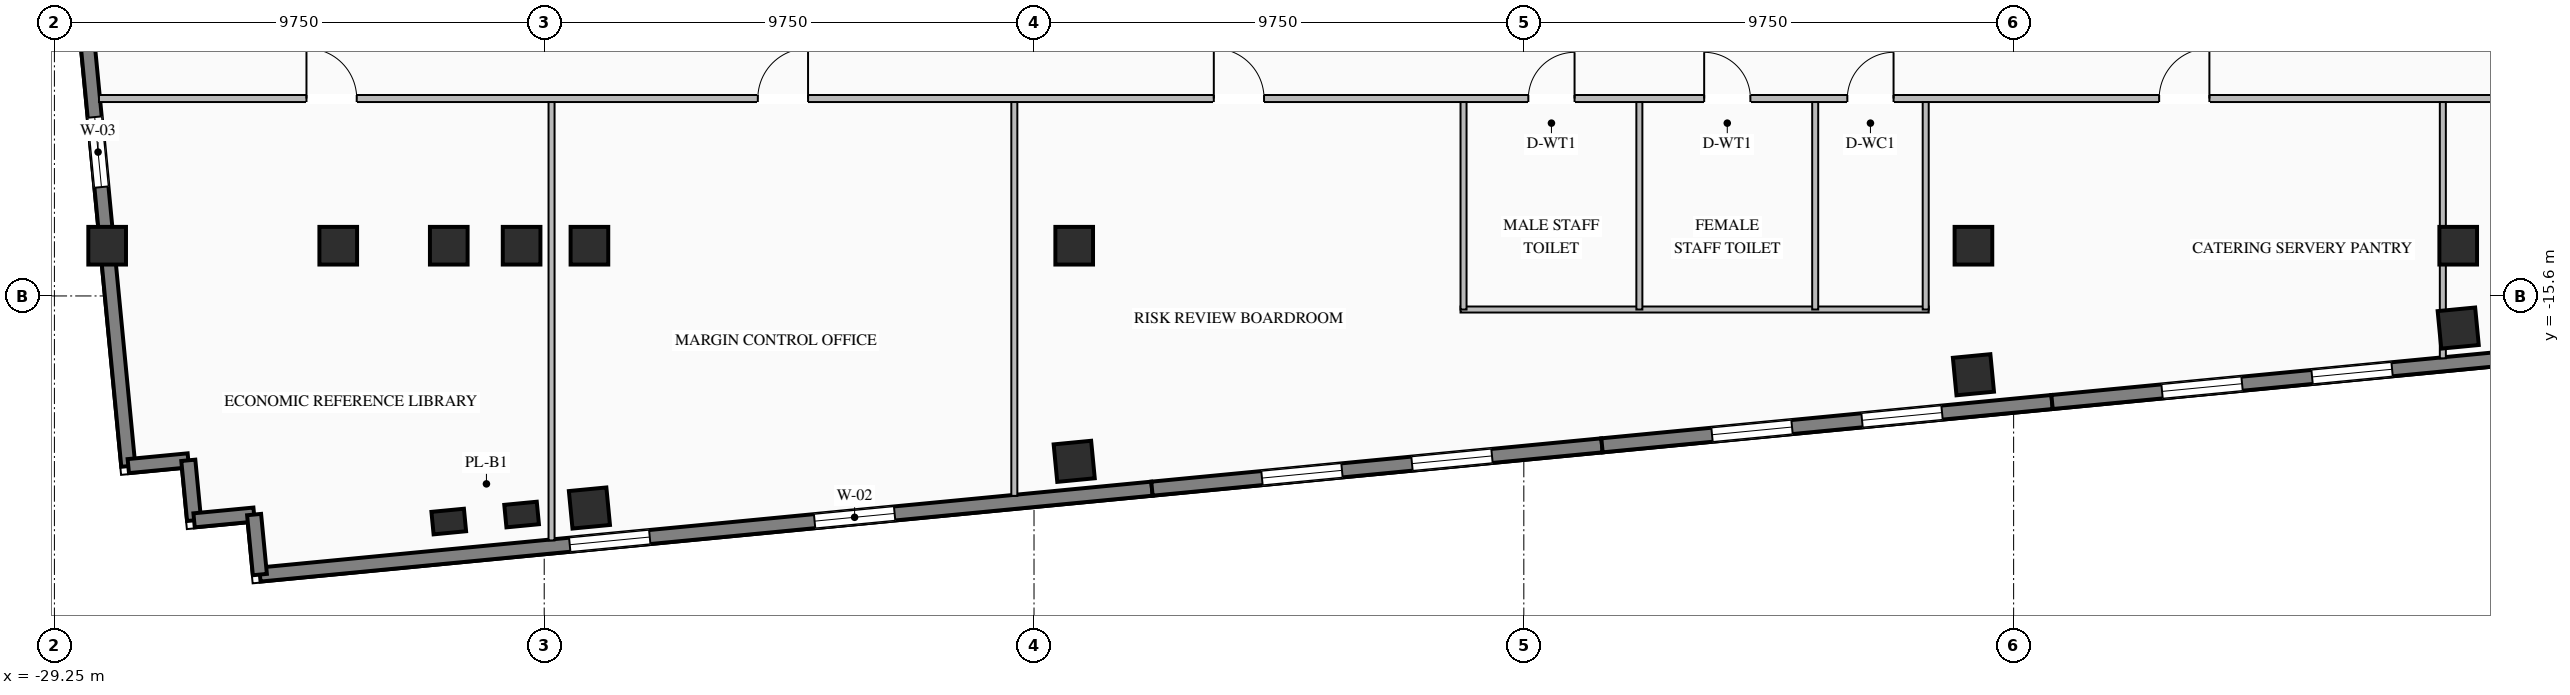
"""IFC4 building model, lengths in metres.
Left out: names, types, materials, properties, quantities, classifications, styles, units other than length and angle.
Written with IfcOpenShell. Run it as: python <this file> out.ifc"""

import sys

from ifc_helpers import new_model, si_unit, direction, frame, frame_2d, origin, origin_2d, place, context, subcontext, project, spatial, rectangle, i_section, extrude, element, fill, save


model = new_model("IFC4")
c1 = context("Model", 3, precision=1e-05, world=origin(), true_north=direction((0.0, 1.0)))
c2 = subcontext(c1, "Body", "Model", "MODEL_VIEW")
j1 = project(units=[si_unit("LENGTHUNIT", "METRE"), si_unit("PLANEANGLEUNIT", "RADIAN")], contexts=[c1])
p1 = place(None, origin())
s1 = spatial("IfcSite", under=j1, at=p1, CompositionType="ELEMENT")
p2 = place(p1, origin())
s2 = spatial("IfcBuilding", under=s1, at=p2, CompositionType="ELEMENT")
p3 = place(p2, frame((0.0, 0.0, 101.8)))
s3 = spatial("IfcBuildingStorey", under=s2, at=p3, CompositionType="ELEMENT", Elevation=101.8)
for number, where, z_axis, x_axis in (
    (1, (-21.4, -14.6, 0.0), (0.0, 0.0, 1.0), (1.0, 0.0, 0.0)),
    (2, (-19.95, -14.6, 0.0), (0.0, 0.0, 1.0), (1.0, 0.0, 0.0)),
    (3, (-18.6, -14.6, 0.0), (0.0, 0.0, 1.0), (1.0, 0.0, 0.0)),
    (4, (-8.95, -14.6, 0.0), (0.0, 0.0, 1.0), (1.0, 0.0, 0.0)),
    (5, (8.95, -14.6, 0.0), (0.0, 0.0, 1.0), (1.0, 0.0, 0.0)),
    (6, (18.6, -14.6, 0.0), (0.0, 0.0, 1.0), (1.0, 0.0, 0.0)),
    (7, (-23.6, -14.6, 0.0), (0.0, 0.0, 1.0), (1.0, 0.0, 0.0)),
    (8, (-28.2, -14.6, 0.0), (0.0, 0.0, 1.0), (1.0, 0.0, 0.0)),
    (9, (-18.6, -19.821, 0.0), (0.0, 0.0, 1.0), (0.995, 0.096, 0.0)),
    (10, (-8.95, -18.892, 0.0), (0.0, 0.0, 1.0), (0.995, 0.096, 0.0)),
    (11, (8.95, -17.168, 0.0), (0.0, 0.0, 1.0), (0.995, 0.096, 0.0)),
    (12, (18.6, -16.239, 0.0), (0.0, 0.0, 1.0), (0.995, 0.096, 0.0)),
):
    element("IfcColumn", number, at=place(p3, frame(where, z_axis=z_axis, x_axis=x_axis)), inside=s3, PredefinedType="COLUMN", context=c2, shape_type="SweptSolid", body=[
        extrude(i_section(OverallWidth=0.75, OverallDepth=0.75, WebThickness=0.03, FlangeThickness=0.044, at=origin_2d()), origin(), (0.0, 0.0, 1.0), 3.45),
    ])
for number, where, z_axis, x_axis in (
    (13, (-21.4, -20.091, 0.0), (0.0, 0.0, 1.0), (0.995, 0.096, 0.0)),
    (14, (-19.95, -19.951, 0.0), (0.0, 0.0, 1.0), (0.995, 0.096, 0.0)),
):
    element("IfcColumn", number, at=place(p3, frame(where, z_axis=z_axis, x_axis=x_axis)), inside=s3, PredefinedType="PILASTER", context=c2, shape_type="SweptSolid", body=[
        extrude(rectangle(XDim=0.65, YDim=0.45, at=origin_2d()), origin(), (0.0, 0.0, 1.0), 3.45),
    ])
p4 = place(p3, frame((-7.402, -19.436, 0.0), z_axis=(0.0, 0.0, 1.0), x_axis=(-0.995395780835, -0.095850088663, 0.0)))
e15 = element("IfcWall", 15, at=p4, inside=s3, PredefinedType="STANDARD", context=c2, shape_type="SweptSolid", body=[
    extrude(rectangle(XDim=17.84, YDim=0.28, at=frame_2d((8.92, 0.0))), origin(), (0.0, 0.0, 1.0), 3.25),
])
p5 = place(p4, frame((5.147, 0.0, 0.76)))
e16 = element("IfcOpeningElement", 16, at=p5, cuts=e15, PredefinedType="OPENING", context=c2, shape_type="SweptSolid", body=[
    extrude(rectangle(XDim=1.6, YDim=1.95, at=frame_2d((0.8, 0.975))), frame((0.0, 0.15, 0.0), z_axis=(0.0, -1.0, 0.0), x_axis=(1.0, 0.0, 0.0)), (0.0, 0.0, 1.0), 0.3),
])
p6 = place(p4, frame((10.043, 0.0, 0.76)))
e17 = element("IfcOpeningElement", 17, at=p6, cuts=e15, PredefinedType="OPENING", context=c2, shape_type="SweptSolid", body=[
    extrude(rectangle(XDim=1.6, YDim=1.95, at=frame_2d((0.8, 0.975))), frame((0.0, 0.15, 0.0), z_axis=(0.0, -1.0, 0.0), x_axis=(1.0, 0.0, 0.0)), (0.0, 0.0, 1.0), 0.3),
])
p7 = place(p3, frame((1.556, -18.573, 0.0), z_axis=(0.0, 0.0, 1.0), x_axis=(-0.995396794462, -0.09583956164, 0.0)))
e18 = element("IfcWall", 18, at=p7, inside=s3, PredefinedType="STANDARD", context=c2, shape_type="SweptSolid", body=[
    extrude(rectangle(XDim=9.0, YDim=0.28, at=frame_2d((4.5, 0.0))), origin(), (0.0, 0.0, 1.0), 3.25),
])
p8 = place(p7, frame((2.2, 0.0, 0.76)))
e19 = element("IfcOpeningElement", 19, at=p8, cuts=e18, PredefinedType="OPENING", context=c2, shape_type="SweptSolid", body=[
    extrude(rectangle(XDim=1.6, YDim=1.95, at=frame_2d((0.8, 0.975))), frame((0.0, 0.15, 0.0), z_axis=(0.0, -1.0, 0.0), x_axis=(1.0, 0.0, 0.0)), (0.0, 0.0, 1.0), 0.3),
])
p9 = place(p7, frame((5.2, 0.0, 0.76)))
e20 = element("IfcOpeningElement", 20, at=p9, cuts=e18, PredefinedType="OPENING", context=c2, shape_type="SweptSolid", body=[
    extrude(rectangle(XDim=1.6, YDim=1.95, at=frame_2d((0.8, 0.975))), frame((0.0, 0.15, 0.0), z_axis=(0.0, -1.0, 0.0), x_axis=(1.0, 0.0, 0.0)), (0.0, 0.0, 1.0), 0.3),
])
p10 = place(p3, frame((10.515, -17.711, 0.0), z_axis=(0.0, 0.0, 1.0), x_axis=(-0.995397043619, -0.095836973841, 0.0)))
e21 = element("IfcWall", 21, at=p10, inside=s3, PredefinedType="STANDARD", context=c2, shape_type="SweptSolid", body=[
    extrude(rectangle(XDim=9.0, YDim=0.28, at=frame_2d((4.5, 0.0))), origin(), (0.0, 0.0, 1.0), 3.25),
])
p11 = place(p10, frame((2.2, 0.0, 0.76)))
e22 = element("IfcOpeningElement", 22, at=p11, cuts=e21, PredefinedType="OPENING", context=c2, shape_type="SweptSolid", body=[
    extrude(rectangle(XDim=1.6, YDim=1.95, at=frame_2d((0.8, 0.975))), frame((0.0, 0.15, 0.0), z_axis=(0.0, -1.0, 0.0), x_axis=(1.0, 0.0, 0.0)), (0.0, 0.0, 1.0), 0.3),
])
p12 = place(p10, frame((5.2, 0.0, 0.76)))
e23 = element("IfcOpeningElement", 23, at=p12, cuts=e21, PredefinedType="OPENING", context=c2, shape_type="SweptSolid", body=[
    extrude(rectangle(XDim=1.6, YDim=1.95, at=frame_2d((0.8, 0.975))), frame((0.0, 0.15, 0.0), z_axis=(0.0, -1.0, 0.0), x_axis=(1.0, 0.0, 0.0)), (0.0, 0.0, 1.0), 0.3),
])
p13 = place(p3, frame((19.474, -16.848, 0.0), z_axis=(0.0, 0.0, 1.0), x_axis=(-0.995396794462, -0.09583956164, 0.0)))
e24 = element("IfcWall", 24, at=p13, inside=s3, PredefinedType="STANDARD", context=c2, shape_type="SweptSolid", body=[
    extrude(rectangle(XDim=9.0, YDim=0.28, at=frame_2d((4.5, 0.0))), origin(), (0.0, 0.0, 1.0), 3.25),
])
p14 = place(p13, frame((2.2, 0.0, 0.76)))
e25 = element("IfcOpeningElement", 25, at=p14, cuts=e24, PredefinedType="OPENING", context=c2, shape_type="SweptSolid", body=[
    extrude(rectangle(XDim=1.6, YDim=1.95, at=frame_2d((0.8, 0.975))), frame((0.0, 0.15, 0.0), z_axis=(0.0, -1.0, 0.0), x_axis=(1.0, 0.0, 0.0)), (0.0, 0.0, 1.0), 0.3),
])
p15 = place(p13, frame((5.2, 0.0, 0.76)))
e26 = element("IfcOpeningElement", 26, at=p15, cuts=e24, PredefinedType="OPENING", context=c2, shape_type="SweptSolid", body=[
    extrude(rectangle(XDim=1.6, YDim=1.95, at=frame_2d((0.8, 0.975))), frame((0.0, 0.15, 0.0), z_axis=(0.0, -1.0, 0.0), x_axis=(1.0, 0.0, 0.0)), (0.0, 0.0, 1.0), 0.3),
])
p16 = place(p3, frame((-27.779, -18.987, 0.0), z_axis=(0.0, 0.0, 1.0), x_axis=(-0.095842534142, 0.995396508256, 0.0)))
e27 = element("IfcWall", 27, at=p16, inside=s3, PredefinedType="STANDARD", context=c2, shape_type="SweptSolid", body=[
    extrude(rectangle(XDim=18.84, YDim=0.28, at=frame_2d((9.42, 0.0))), origin(), (0.0, 0.0, 1.0), 3.25),
])
p17 = place(p16, frame((5.58, 0.0, 0.76)))
e28 = element("IfcOpeningElement", 28, at=p17, cuts=e27, PredefinedType="OPENING", context=c2, shape_type="SweptSolid", body=[
    extrude(rectangle(XDim=1.4, YDim=1.95, at=frame_2d((0.7, 0.975))), frame((0.0, 0.15, 0.0), z_axis=(0.0, -1.0, 0.0), x_axis=(1.0, 0.0, 0.0)), (0.0, 0.0, 1.0), 0.3),
])
p18 = place(p16, frame((11.86, 0.0, 0.76)))
e29 = element("IfcOpeningElement", 29, at=p18, cuts=e27, PredefinedType="OPENING", context=c2, shape_type="SweptSolid", body=[
    extrude(rectangle(XDim=1.4, YDim=1.95, at=frame_2d((0.7, 0.975))), frame((0.0, 0.15, 0.0), z_axis=(0.0, -1.0, 0.0), x_axis=(1.0, 0.0, 0.0)), (0.0, 0.0, 1.0), 0.3),
])
for number, where, z_axis, x_axis in (
    (30, (-27.779, -18.987, 0.0), (0.0, 0.0, 1.0), (0.995, 0.096, 0.0)),
    (31, (-26.584, -18.872, 0.0), (0.0, 0.0, 1.0), (0.096, -0.995, 0.0)),
    (32, (-26.469, -20.067, 0.0), (0.0, 0.0, 1.0), (0.995, 0.096, 0.0)),
):
    element("IfcWall", number, at=place(p3, frame(where, z_axis=z_axis, x_axis=x_axis)), inside=s3, PredefinedType="STANDARD", context=c2, shape_type="SweptSolid", body=[
        extrude(rectangle(XDim=1.2, YDim=0.28, at=frame_2d((0.6, 0.0))), origin(), (0.0, 0.0, 1.0), 3.25),
    ])
p19 = place(p3, frame((-25.275, -19.952, 0.0), z_axis=(0.0, 0.0, 1.0), x_axis=(0.095836473879, -0.995397091755, 0.0)))
e33 = element("IfcWall", 33, at=p19, inside=s3, PredefinedType="STANDARD", context=c2, shape_type="SweptSolid", body=[
    extrude(rectangle(XDim=1.2, YDim=0.28, at=frame_2d((0.6, 0.0))), origin(), (0.0, 0.0, 1.0), 3.25),
])
p20 = place(p3, frame((-28.363, -11.67, 0.0), z_axis=(0.0, 0.0, 1.0), x_axis=(1.0, 0.0, 0.0)))
e34 = element("IfcWall", 34, at=p20, inside=s3, PredefinedType="STANDARD", context=c2, shape_type="SweptSolid", body=[
    extrude(rectangle(XDim=67.551, YDim=0.14, at=frame_2d((33.775, 0.0))), origin(), (0.0, 0.0, 1.0), 3.25),
])
p21 = place(p20, frame((28.453, 0.0, 0.0)))
e35 = element("IfcOpeningElement", 35, at=p21, cuts=e34, PredefinedType="OPENING", context=c2, shape_type="SweptSolid", body=[
    extrude(rectangle(XDim=0.92, YDim=2.08, at=frame_2d((0.46, 1.04))), frame((0.0, 0.08, 0.0), z_axis=(0.0, -1.0, 0.0), x_axis=(1.0, 0.0, 0.0)), (0.0, 0.0, 1.0), 0.16),
])
p22 = place(p20, frame((31.953, 0.0, 0.0)))
e36 = element("IfcOpeningElement", 36, at=p22, cuts=e34, PredefinedType="OPENING", context=c2, shape_type="SweptSolid", body=[
    extrude(rectangle(XDim=0.92, YDim=2.08, at=frame_2d((0.46, 1.04))), frame((0.0, 0.08, 0.0), z_axis=(0.0, -1.0, 0.0), x_axis=(1.0, 0.0, 0.0)), (0.0, 0.0, 1.0), 0.16),
])
p23 = place(p20, frame((34.803, 0.0, 0.0)))
e37 = element("IfcOpeningElement", 37, at=p23, cuts=e34, PredefinedType="OPENING", context=c2, shape_type="SweptSolid", body=[
    extrude(rectangle(XDim=0.92, YDim=2.08, at=frame_2d((0.46, 1.04))), frame((0.0, 0.08, 0.0), z_axis=(0.0, -1.0, 0.0), x_axis=(1.0, 0.0, 0.0)), (0.0, 0.0, 1.0), 0.16),
])
p24 = place(p20, frame((4.13, 0.0, 0.0)))
e38 = element("IfcOpeningElement", 38, at=p24, cuts=e34, PredefinedType="OPENING", context=c2, shape_type="SweptSolid", body=[
    extrude(rectangle(XDim=1.0, YDim=2.08, at=frame_2d((0.5, 1.04))), frame((0.0, 0.08, 0.0), z_axis=(0.0, -1.0, 0.0), x_axis=(1.0, 0.0, 0.0)), (0.0, 0.0, 1.0), 0.16),
])
p25 = place(p20, frame((13.115, 0.0, 0.0)))
e39 = element("IfcOpeningElement", 39, at=p25, cuts=e34, PredefinedType="OPENING", context=c2, shape_type="SweptSolid", body=[
    extrude(rectangle(XDim=1.0, YDim=2.08, at=frame_2d((0.5, 1.04))), frame((0.0, 0.08, 0.0), z_axis=(0.0, -1.0, 0.0), x_axis=(1.0, 0.0, 0.0)), (0.0, 0.0, 1.0), 0.16),
])
p26 = place(p20, frame((22.192, 0.0, 0.0)))
e40 = element("IfcOpeningElement", 40, at=p26, cuts=e34, PredefinedType="OPENING", context=c2, shape_type="SweptSolid", body=[
    extrude(rectangle(XDim=1.0, YDim=2.08, at=frame_2d((0.5, 1.04))), frame((0.0, 0.08, 0.0), z_axis=(0.0, -1.0, 0.0), x_axis=(1.0, 0.0, 0.0)), (0.0, 0.0, 1.0), 0.16),
])
p27 = place(p20, frame((41.01, 0.0, 0.0)))
e41 = element("IfcOpeningElement", 41, at=p27, cuts=e34, PredefinedType="OPENING", context=c2, shape_type="SweptSolid", body=[
    extrude(rectangle(XDim=1.0, YDim=2.08, at=frame_2d((0.5, 1.04))), frame((0.0, 0.08, 0.0), z_axis=(0.0, -1.0, 0.0), x_axis=(1.0, 0.0, 0.0)), (0.0, 0.0, 1.0), 0.16),
])
p28 = place(p20, frame((51.46, 0.0, 0.0)))
e42 = element("IfcOpeningElement", 42, at=p28, cuts=e34, PredefinedType="OPENING", context=c2, shape_type="SweptSolid", body=[
    extrude(rectangle(XDim=1.0, YDim=2.08, at=frame_2d((0.5, 1.04))), frame((0.0, 0.08, 0.0), z_axis=(0.0, -1.0, 0.0), x_axis=(1.0, 0.0, 0.0)), (0.0, 0.0, 1.0), 0.16),
])
p29 = place(p20, frame((61.781, 0.0, 0.0)))
e43 = element("IfcOpeningElement", 43, at=p29, cuts=e34, PredefinedType="OPENING", context=c2, shape_type="SweptSolid", body=[
    extrude(rectangle(XDim=1.0, YDim=2.08, at=frame_2d((0.5, 1.04))), frame((0.0, 0.08, 0.0), z_axis=(0.0, -1.0, 0.0), x_axis=(1.0, 0.0, 0.0)), (0.0, 0.0, 1.0), 0.16),
])
p30 = place(p3, frame((-1.26, -15.87, 0.0), z_axis=(0.0, 0.0, 1.0), x_axis=(1.0, 0.0, 0.0)))
e44 = element("IfcWall", 44, at=p30, inside=s3, PredefinedType="STANDARD", context=c2, shape_type="SweptSolid", body=[
    extrude(rectangle(XDim=9.32, YDim=0.12, at=frame_2d((4.66, 0.0))), origin(), (0.0, 0.0, 1.0), 3.25),
])
for number, where, z_axis, x_axis in (
    (45, (-1.2, -15.87, 0.0), (0.0, 0.0, 1.0), (0.0, 1.0, 0.0)),
    (46, (2.3, -15.87, 0.0), (0.0, 0.0, 1.0), (0.0, 1.0, 0.0)),
    (47, (5.8, -15.87, 0.0), (0.0, 0.0, 1.0), (0.0, 1.0, 0.0)),
    (48, (8.0, -15.87, 0.0), (0.0, 0.0, 1.0), (0.0, 1.0, 0.0)),
):
    element("IfcWall", number, at=place(p3, frame(where, z_axis=z_axis, x_axis=x_axis)), inside=s3, PredefinedType="STANDARD", context=c2, shape_type="SweptSolid", body=[
        extrude(rectangle(XDim=4.13, YDim=0.12, at=frame_2d((2.065, 0.0))), origin(), (0.0, 0.0, 1.0), 3.25),
    ])
p31 = place(p3, frame((-19.354, -20.466, 0.0), z_axis=(0.0, 0.0, 1.0), x_axis=(0.0, 1.0, 0.0)))
e49 = element("IfcWall", 49, at=p31, inside=s3, PredefinedType="STANDARD", context=c2, shape_type="SweptSolid", body=[
    extrude(rectangle(XDim=8.726, YDim=0.12, at=frame_2d((4.363, 0.0))), origin(), (0.0, 0.0, 1.0), 3.25),
])
p32 = place(p3, frame((-10.142, -19.579, 0.0), z_axis=(0.0, 0.0, 1.0), x_axis=(0.0, 1.0, 0.0)))
e50 = element("IfcWall", 50, at=p32, inside=s3, PredefinedType="STANDARD", context=c2, shape_type="SweptSolid", body=[
    extrude(rectangle(XDim=7.839, YDim=0.12, at=frame_2d((3.92, 0.0))), origin(), (0.0, 0.0, 1.0), 3.25),
])
p33 = place(p3, frame((18.294, -16.841, 0.0), z_axis=(0.0, 0.0, 1.0), x_axis=(0.0, 1.0, 0.0)))
e51 = element("IfcWall", 51, at=p33, inside=s3, PredefinedType="STANDARD", context=c2, shape_type="SweptSolid", body=[
    extrude(rectangle(XDim=5.101, YDim=0.12, at=frame_2d((2.551, 0.0))), origin(), (0.0, 0.0, 1.0), 3.25),
])
p34 = place(p5, origin())
e52 = element("IfcWindow", 52, at=p34, inside=s3, PartitioningType="SINGLE_PANEL", PredefinedType="WINDOW", context=c2, shape_type="SweptSolid", body=[
    extrude(rectangle(XDim=1.6, YDim=1.95, at=frame_2d((0.8, 0.975))), frame((0.0, 0.03, 0.0), z_axis=(0.0, -1.0, 0.0), x_axis=(1.0, 0.0, 0.0)), (0.0, 0.0, 1.0), 0.06),
])
fill(e16, e52)
p35 = place(p6, origin())
e53 = element("IfcWindow", 53, at=p35, inside=s3, PartitioningType="SINGLE_PANEL", PredefinedType="WINDOW", context=c2, shape_type="SweptSolid", body=[
    extrude(rectangle(XDim=1.6, YDim=1.95, at=frame_2d((0.8, 0.975))), frame((0.0, 0.03, 0.0), z_axis=(0.0, -1.0, 0.0), x_axis=(1.0, 0.0, 0.0)), (0.0, 0.0, 1.0), 0.06),
])
fill(e17, e53)
p36 = place(p8, origin())
e54 = element("IfcWindow", 54, at=p36, inside=s3, PartitioningType="SINGLE_PANEL", PredefinedType="WINDOW", context=c2, shape_type="SweptSolid", body=[
    extrude(rectangle(XDim=1.6, YDim=1.95, at=frame_2d((0.8, 0.975))), frame((0.0, 0.03, 0.0), z_axis=(0.0, -1.0, 0.0), x_axis=(1.0, 0.0, 0.0)), (0.0, 0.0, 1.0), 0.06),
])
fill(e19, e54)
p37 = place(p9, origin())
e55 = element("IfcWindow", 55, at=p37, inside=s3, PartitioningType="SINGLE_PANEL", PredefinedType="WINDOW", context=c2, shape_type="SweptSolid", body=[
    extrude(rectangle(XDim=1.6, YDim=1.95, at=frame_2d((0.8, 0.975))), frame((0.0, 0.03, 0.0), z_axis=(0.0, -1.0, 0.0), x_axis=(1.0, 0.0, 0.0)), (0.0, 0.0, 1.0), 0.06),
])
fill(e20, e55)
p38 = place(p11, origin())
e56 = element("IfcWindow", 56, at=p38, inside=s3, PartitioningType="SINGLE_PANEL", PredefinedType="WINDOW", context=c2, shape_type="SweptSolid", body=[
    extrude(rectangle(XDim=1.6, YDim=1.95, at=frame_2d((0.8, 0.975))), frame((0.0, 0.03, 0.0), z_axis=(0.0, -1.0, 0.0), x_axis=(1.0, 0.0, 0.0)), (0.0, 0.0, 1.0), 0.06),
])
fill(e22, e56)
p39 = place(p12, origin())
e57 = element("IfcWindow", 57, at=p39, inside=s3, PartitioningType="SINGLE_PANEL", PredefinedType="WINDOW", context=c2, shape_type="SweptSolid", body=[
    extrude(rectangle(XDim=1.6, YDim=1.95, at=frame_2d((0.8, 0.975))), frame((0.0, 0.03, 0.0), z_axis=(0.0, -1.0, 0.0), x_axis=(1.0, 0.0, 0.0)), (0.0, 0.0, 1.0), 0.06),
])
fill(e23, e57)
p40 = place(p14, origin())
e58 = element("IfcWindow", 58, at=p40, inside=s3, PartitioningType="SINGLE_PANEL", PredefinedType="WINDOW", context=c2, shape_type="SweptSolid", body=[
    extrude(rectangle(XDim=1.6, YDim=1.95, at=frame_2d((0.8, 0.975))), frame((0.0, 0.03, 0.0), z_axis=(0.0, -1.0, 0.0), x_axis=(1.0, 0.0, 0.0)), (0.0, 0.0, 1.0), 0.06),
])
fill(e25, e58)
p41 = place(p15, origin())
e59 = element("IfcWindow", 59, at=p41, inside=s3, PartitioningType="SINGLE_PANEL", PredefinedType="WINDOW", context=c2, shape_type="SweptSolid", body=[
    extrude(rectangle(XDim=1.6, YDim=1.95, at=frame_2d((0.8, 0.975))), frame((0.0, 0.03, 0.0), z_axis=(0.0, -1.0, 0.0), x_axis=(1.0, 0.0, 0.0)), (0.0, 0.0, 1.0), 0.06),
])
fill(e26, e59)
p42 = place(p17, origin())
e60 = element("IfcWindow", 60, at=p42, inside=s3, PartitioningType="SINGLE_PANEL", PredefinedType="WINDOW", context=c2, shape_type="SweptSolid", body=[
    extrude(rectangle(XDim=1.4, YDim=1.95, at=frame_2d((0.7, 0.975))), frame((0.0, 0.03, 0.0), z_axis=(0.0, -1.0, 0.0), x_axis=(1.0, 0.0, 0.0)), (0.0, 0.0, 1.0), 0.06),
])
fill(e28, e60)
p43 = place(p21, origin())
e61 = element("IfcDoor", 61, at=p43, inside=s3, OperationType="SINGLE_SWING_RIGHT", PredefinedType="DOOR", context=c2, shape_type="SweptSolid", body=[
    extrude(rectangle(XDim=0.92, YDim=2.08, at=frame_2d((0.46, 1.04))), frame((0.0, 0.025, 0.0), z_axis=(0.0, -1.0, 0.0), x_axis=(1.0, 0.0, 0.0)), (0.0, 0.0, 1.0), 0.05),
])
fill(e35, e61)
p44 = place(p22, origin())
e62 = element("IfcDoor", 62, at=p44, inside=s3, OperationType="SINGLE_SWING_LEFT", PredefinedType="DOOR", context=c2, shape_type="SweptSolid", body=[
    extrude(rectangle(XDim=0.92, YDim=2.08, at=frame_2d((0.46, 1.04))), frame((0.0, 0.025, 0.0), z_axis=(0.0, -1.0, 0.0), x_axis=(1.0, 0.0, 0.0)), (0.0, 0.0, 1.0), 0.05),
])
fill(e36, e62)
p45 = place(p23, origin())
e63 = element("IfcDoor", 63, at=p45, inside=s3, OperationType="SINGLE_SWING_RIGHT", PredefinedType="DOOR", context=c2, shape_type="SweptSolid", body=[
    extrude(rectangle(XDim=0.92, YDim=2.08, at=frame_2d((0.46, 1.04))), frame((0.0, 0.025, 0.0), z_axis=(0.0, -1.0, 0.0), x_axis=(1.0, 0.0, 0.0)), (0.0, 0.0, 1.0), 0.05),
])
fill(e37, e63)
p46 = place(p24, origin())
e64 = element("IfcDoor", 64, at=p46, inside=s3, OperationType="SINGLE_SWING_LEFT", PredefinedType="DOOR", context=c2, shape_type="SweptSolid", body=[
    extrude(rectangle(XDim=1.0, YDim=2.08, at=frame_2d((0.5, 1.04))), frame((0.0, 0.025, 0.0), z_axis=(0.0, -1.0, 0.0), x_axis=(1.0, 0.0, 0.0)), (0.0, 0.0, 1.0), 0.05),
])
fill(e38, e64)
p47 = place(p25, origin())
e65 = element("IfcDoor", 65, at=p47, inside=s3, OperationType="SINGLE_SWING_RIGHT", PredefinedType="DOOR", context=c2, shape_type="SweptSolid", body=[
    extrude(rectangle(XDim=1.0, YDim=2.08, at=frame_2d((0.5, 1.04))), frame((0.0, 0.025, 0.0), z_axis=(0.0, -1.0, 0.0), x_axis=(1.0, 0.0, 0.0)), (0.0, 0.0, 1.0), 0.05),
])
fill(e39, e65)
p48 = place(p26, origin())
e66 = element("IfcDoor", 66, at=p48, inside=s3, OperationType="SINGLE_SWING_LEFT", PredefinedType="DOOR", context=c2, shape_type="SweptSolid", body=[
    extrude(rectangle(XDim=1.0, YDim=2.08, at=frame_2d((0.5, 1.04))), frame((0.0, 0.025, 0.0), z_axis=(0.0, -1.0, 0.0), x_axis=(1.0, 0.0, 0.0)), (0.0, 0.0, 1.0), 0.05),
])
fill(e40, e66)
p49 = place(p27, origin())
e67 = element("IfcDoor", 67, at=p49, inside=s3, OperationType="SINGLE_SWING_RIGHT", PredefinedType="DOOR", context=c2, shape_type="SweptSolid", body=[
    extrude(rectangle(XDim=1.0, YDim=2.08, at=frame_2d((0.5, 1.04))), frame((0.0, 0.025, 0.0), z_axis=(0.0, -1.0, 0.0), x_axis=(1.0, 0.0, 0.0)), (0.0, 0.0, 1.0), 0.05),
])
fill(e41, e67)
save(model, sys.argv[1])
